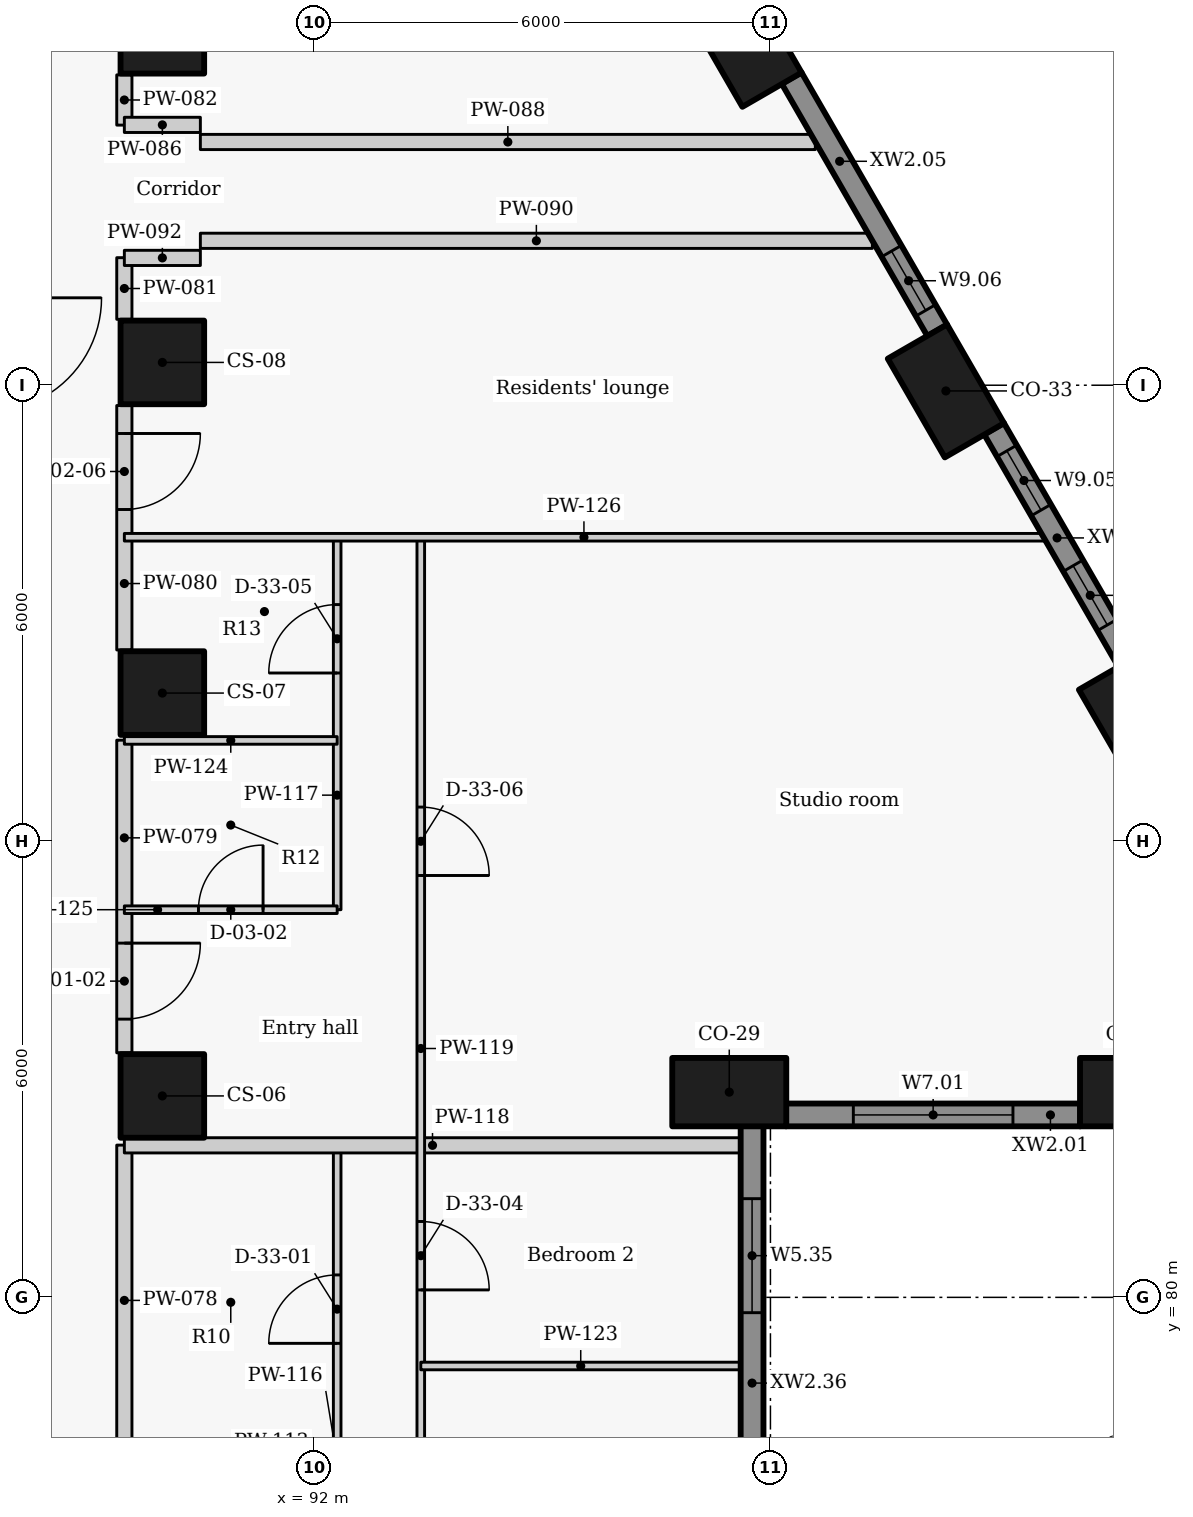
"""IFC4 building model, lengths in metres.
Left out: names, types, materials, properties, quantities, classifications, styles, units other than length and angle.
Written with IfcOpenShell. Run it as: python <this file> out.ifc"""

import sys

from ifc_helpers import new_model, si_unit, direction, frame, frame_2d, origin, origin_2d, place, context, subcontext, project, spatial, rectangle, extrude, element, fill, save


model = new_model("IFC4")
c1 = context("Model", 3, precision=1e-05, world=origin(), true_north=direction((0.0, 1.0)))
c2 = subcontext(c1, "Body", "Model", "MODEL_VIEW")
j1 = project(units=[si_unit("LENGTHUNIT", "METRE"), si_unit("PLANEANGLEUNIT", "RADIAN")], contexts=[c1])
p1 = place(None, origin())
s1 = spatial("IfcSite", under=j1, at=p1, CompositionType="ELEMENT")
p2 = place(p1, origin())
s2 = spatial("IfcBuilding", under=s1, at=p2, CompositionType="ELEMENT")
p3 = place(p2, frame((0.0, 0.0, 41.4)))
s3 = spatial("IfcBuildingStorey", under=s2, at=p3, CompositionType="ELEMENT", Elevation=41.4)
for number, where, z_axis, x_axis in (
    (1, (97.458, 82.7, -0.275), (0.0, 0.0, 1.0), (1.0, 0.0, 0.0)),
    (2, (102.823, 82.7, -0.275), (0.0, 0.0, 1.0), (1.0, 0.0, 0.0)),
    (3, (102.823, 87.57, -0.275), (0.0, 0.0, 1.0), (-0.5, 0.866, 0.0)),
):
    element("IfcColumn", number, at=place(p3, frame(where, z_axis=z_axis, x_axis=x_axis)), inside=s3, PredefinedType="COLUMN", context=c2, shape_type="SweptSolid", body=[
        extrude(rectangle(XDim=1.5, YDim=0.9, at=origin_2d()), origin(), (0.0, 0.0, 1.0), 3.575),
    ])
for number, where, z_axis, x_axis in (
    (4, (100.308, 91.925, 0.0), (0.0, 0.0, 1.0), (-0.5, 0.866, 0.0)),
    (5, (97.646, 96.537, 0.0), (0.0, 0.0, 1.0), (-0.5, 0.866, 0.0)),
):
    element("IfcColumn", number, at=place(p3, frame(where, z_axis=z_axis, x_axis=x_axis)), inside=s3, PredefinedType="COLUMN", context=c2, shape_type="SweptSolid", body=[
        extrude(rectangle(XDim=1.5, YDim=0.9, at=origin_2d()), origin(), (0.0, 0.0, 1.0), 3.3),
    ])
p4 = place(p3, frame((90.0, 82.65, -0.275), z_axis=(0.0, 0.0, 1.0), x_axis=(0.0, 1.0, 0.0)))
e6 = element("IfcColumn", 6, at=p4, inside=s3, PredefinedType="COLUMN", context=c2, shape_type="SweptSolid", body=[
    extrude(rectangle(XDim=1.1, YDim=1.1, at=origin_2d()), origin(), (0.0, 0.0, 1.0), 3.575),
])
for number, where, z_axis, x_axis in (
    (7, (90.0, 87.95, 0.0), (0.0, 0.0, 1.0), (0.0, 1.0, 0.0)),
    (8, (90.0, 92.3, 0.0), (0.0, 0.0, 1.0), (0.0, 1.0, 0.0)),
    (9, (90.0, 96.65, 0.0), (0.0, 0.0, 1.0), (0.0, 1.0, 0.0)),
):
    element("IfcColumn", number, at=place(p3, frame(where, z_axis=z_axis, x_axis=x_axis)), inside=s3, PredefinedType="COLUMN", context=c2, shape_type="SweptSolid", body=[
        extrude(rectangle(XDim=1.1, YDim=1.1, at=origin_2d()), origin(), (0.0, 0.0, 1.0), 3.3),
    ])
p5 = place(p3, frame((98.204, 82.4, 0.0), z_axis=(0.0, 0.0, 1.0), x_axis=(1.0, 0.0, 0.0)))
e10 = element("IfcWall", 10, at=p5, inside=s3, PredefinedType="SOLIDWALL", context=c2, shape_type="SweptSolid", body=[
    extrude(rectangle(XDim=3.873, YDim=0.3, at=frame_2d((1.936, 0.0))), origin(), (0.0, 0.0, 1.0), 2.425),
])
p6 = place(p5, frame((0.886, 0.0, 0.9)))
e11 = element("IfcOpeningElement", 11, at=p6, cuts=e10, PredefinedType="OPENING", context=c2, shape_type="SweptSolid", body=[
    extrude(rectangle(XDim=2.1, YDim=1.1, at=frame_2d((1.05, 0.55))), frame((0.0, 0.16, 0.0), z_axis=(0.0, -1.0, 0.0), x_axis=(1.0, 0.0, 0.0)), (0.0, 0.0, 1.0), 0.32),
])
p7 = place(p3, frame((102.71, 88.366, 0.0), z_axis=(0.0, 0.0, 1.0), x_axis=(-0.499977402622, 0.866038449993, 0.0)))
e12 = element("IfcWall", 12, at=p7, inside=s3, PredefinedType="SOLIDWALL", context=c2, shape_type="SweptSolid", body=[
    extrude(rectangle(XDim=3.537, YDim=0.3, at=frame_2d((1.769, 0.0))), origin(), (0.0, 0.0, 1.0), 2.425),
])
p8 = place(p7, frame((0.555, 0.0, 0.9)))
e13 = element("IfcOpeningElement", 13, at=p8, cuts=e12, PredefinedType="OPENING", context=c2, shape_type="SweptSolid", body=[
    extrude(rectangle(XDim=0.9, YDim=1.1, at=frame_2d((0.45, 0.55))), frame((0.0, 0.16, 0.0), z_axis=(0.0, -1.0, 0.0), x_axis=(1.0, 0.0, 0.0)), (0.0, 0.0, 1.0), 0.32),
])
p9 = place(p7, frame((2.299, 0.0, 0.9)))
e14 = element("IfcOpeningElement", 14, at=p9, cuts=e12, PredefinedType="OPENING", context=c2, shape_type="SweptSolid", body=[
    extrude(rectangle(XDim=0.9, YDim=1.1, at=frame_2d((0.45, 0.55))), frame((0.0, 0.16, 0.0), z_axis=(0.0, -1.0, 0.0), x_axis=(1.0, 0.0, 0.0)), (0.0, 0.0, 1.0), 0.32),
])
p10 = place(p3, frame((100.195, 92.721, 0.0), z_axis=(0.0, 0.0, 1.0), x_axis=(-0.500001735503, 0.866024401789, 0.0)))
e15 = element("IfcWall", 15, at=p10, inside=s3, PredefinedType="SOLIDWALL", context=c2, shape_type="SweptSolid", body=[
    extrude(rectangle(XDim=3.834, YDim=0.3, at=frame_2d((1.917, 0.0))), origin(), (0.0, 0.0, 1.0), 2.425),
])
p11 = place(p10, frame((0.305, 0.0, 0.9)))
e16 = element("IfcOpeningElement", 16, at=p11, cuts=e15, PredefinedType="OPENING", context=c2, shape_type="SweptSolid", body=[
    extrude(rectangle(XDim=0.9, YDim=1.1, at=frame_2d((0.45, 0.55))), frame((0.0, 0.16, 0.0), z_axis=(0.0, -1.0, 0.0), x_axis=(1.0, 0.0, 0.0)), (0.0, 0.0, 1.0), 0.32),
])
p12 = place(p3, frame((97.758, 78.046, 0.0), z_axis=(0.0, 0.0, 1.0), x_axis=(0.0, 1.0, 0.0)))
e17 = element("IfcWall", 17, at=p12, inside=s3, PredefinedType="SOLIDWALL", context=c2, shape_type="SweptSolid", body=[
    extrude(rectangle(XDim=4.208, YDim=0.3, at=frame_2d((2.104, 0.0))), origin(), (0.0, 0.0, 1.0), 2.425),
])
p13 = place(p12, frame((1.752, 0.0, 0.9)))
e18 = element("IfcOpeningElement", 18, at=p13, cuts=e17, PredefinedType="OPENING", context=c2, shape_type="SweptSolid", body=[
    extrude(rectangle(XDim=1.5, YDim=1.1, at=frame_2d((0.75, 0.55))), frame((0.0, 0.16, 0.0), z_axis=(0.0, -1.0, 0.0), x_axis=(1.0, 0.0, 0.0)), (0.0, 0.0, 1.0), 0.32),
])
p14 = place(p3, frame((89.5, 77.917, 0.0), z_axis=(0.0, 0.0, 1.0), x_axis=(0.0, 1.0, 0.0)))
e19 = element("IfcWall", 19, at=p14, inside=s3, PredefinedType="PARTITIONING", context=c2, shape_type="SweptSolid", body=[
    extrude(rectangle(XDim=4.086, YDim=0.2, at=frame_2d((2.043, 0.0))), origin(), (0.0, 0.0, 1.0), 3.025),
])
p15 = place(p3, frame((89.5, 87.33, 0.0), z_axis=(0.0, 0.0, 1.0), x_axis=(0.0, -1.0, 0.0)))
e20 = element("IfcWall", 20, at=p15, inside=s3, PredefinedType="PARTITIONING", context=c2, shape_type="SweptSolid", body=[
    extrude(rectangle(XDim=4.113, YDim=0.2, at=frame_2d((2.057, 0.0))), origin(), (0.0, 0.0, 1.0), 3.025),
])
p16 = place(p15, frame((2.67, 0.0, 0.0)))
e21 = element("IfcOpeningElement", 21, at=p16, cuts=e20, PredefinedType="OPENING", context=c2, shape_type="SweptSolid", body=[
    extrude(rectangle(XDim=1.0, YDim=2.1, at=frame_2d((0.5, 1.05))), frame((0.0, 0.11, 0.0), z_axis=(0.0, -1.0, 0.0), x_axis=(1.0, 0.0, 0.0)), (0.0, 0.0, 1.0), 0.22),
])
p17 = place(p3, frame((89.5, 91.733, 0.0), z_axis=(0.0, 0.0, 1.0), x_axis=(0.0, -1.0, 0.0)))
e22 = element("IfcWall", 22, at=p17, inside=s3, PredefinedType="PARTITIONING", context=c2, shape_type="SweptSolid", body=[
    extrude(rectangle(XDim=3.216, YDim=0.2, at=frame_2d((1.608, 0.0))), origin(), (0.0, 0.0, 1.0), 3.025),
])
p18 = place(p17, frame((0.368, 0.0, 0.0)))
e23 = element("IfcOpeningElement", 23, at=p18, cuts=e22, PredefinedType="OPENING", context=c2, shape_type="SweptSolid", body=[
    extrude(rectangle(XDim=1.0, YDim=2.1, at=frame_2d((0.5, 1.05))), frame((0.0, 0.11, 0.0), z_axis=(0.0, -1.0, 0.0), x_axis=(1.0, 0.0, 0.0)), (0.0, 0.0, 1.0), 0.22),
])
p19 = place(p3, frame((89.5, 92.867, 0.0), z_axis=(0.0, 0.0, 1.0), x_axis=(0.0, 1.0, 0.0)))
e24 = element("IfcWall", 24, at=p19, inside=s3, PredefinedType="PARTITIONING", context=c2, shape_type="SweptSolid", body=[
    extrude(rectangle(XDim=0.811, YDim=0.2, at=frame_2d((0.406, 0.0))), origin(), (0.0, 0.0, 1.0), 3.025),
])
p20 = place(p3, frame((89.5, 95.422, 0.0), z_axis=(0.0, 0.0, 1.0), x_axis=(0.0, 1.0, 0.0)))
e25 = element("IfcWall", 25, at=p20, inside=s3, PredefinedType="PARTITIONING", context=c2, shape_type="SweptSolid", body=[
    extrude(rectangle(XDim=0.661, YDim=0.2, at=frame_2d((0.331, 0.0))), origin(), (0.0, 0.0, 1.0), 3.025),
])
p21 = place(p3, frame((89.5, 95.425, 0.0), z_axis=(0.0, 0.0, 1.0), x_axis=(1.0, 0.0, 0.0)))
e26 = element("IfcWall", 26, at=p21, inside=s3, PredefinedType="PARTITIONING", context=c2, shape_type="SweptSolid", body=[
    extrude(rectangle(XDim=1.0, YDim=0.2, at=frame_2d((0.5, 0.0))), origin(), (0.0, 0.0, 1.0), 2.505),
])
p22 = place(p3, frame((90.5, 95.2, 0.0), z_axis=(0.0, 0.0, 1.0), x_axis=(1.0, 0.0, 0.0)))
e27 = element("IfcWall", 27, at=p22, inside=s3, PredefinedType="PARTITIONING", context=c2, shape_type="SweptSolid", body=[
    extrude(rectangle(XDim=8.091, YDim=0.2, at=frame_2d((4.045, 0.0))), origin(), (0.0, 0.0, 1.0), 2.405),
])
p23 = place(p3, frame((90.5, 93.9, 0.0), z_axis=(0.0, 0.0, 1.0), x_axis=(1.0, 0.0, 0.0)))
e28 = element("IfcWall", 28, at=p23, inside=s3, PredefinedType="PARTITIONING", context=c2, shape_type="SweptSolid", body=[
    extrude(rectangle(XDim=8.841, YDim=0.2, at=frame_2d((4.421, 0.0))), origin(), (0.0, 0.0, 1.0), 2.405),
])
p24 = place(p3, frame((89.5, 93.675, 0.0), z_axis=(0.0, 0.0, 1.0), x_axis=(1.0, 0.0, 0.0)))
e29 = element("IfcWall", 29, at=p24, inside=s3, PredefinedType="PARTITIONING", context=c2, shape_type="SweptSolid", body=[
    extrude(rectangle(XDim=1.0, YDim=0.2, at=frame_2d((0.5, 0.0))), origin(), (0.0, 0.0, 1.0), 2.505),
])
p25 = place(p3, frame((92.3, 74.1, 0.0), z_axis=(0.0, 0.0, 1.0), x_axis=(0.0, 1.0, 0.0)))
e30 = element("IfcWall", 30, at=p25, inside=s3, PredefinedType="PARTITIONING", context=c2, shape_type="SweptSolid", body=[
    extrude(rectangle(XDim=7.9, YDim=0.1, at=frame_2d((3.95, 0.0))), origin(), (0.0, 0.0, 1.0), 3.025),
])
p26 = place(p25, frame((1.37, 0.0, 0.0)))
e31 = element("IfcOpeningElement", 31, at=p26, cuts=e30, PredefinedType="OPENING", context=c2, shape_type="SweptSolid", body=[
    extrude(rectangle(XDim=0.85, YDim=2.1, at=frame_2d((0.425, 1.05))), frame((0.0, 0.06, 0.0), z_axis=(0.0, -1.0, 0.0), x_axis=(1.0, 0.0, 0.0)), (0.0, 0.0, 1.0), 0.12),
])
p27 = place(p25, frame((5.295, 0.0, 0.0)))
e32 = element("IfcOpeningElement", 32, at=p27, cuts=e30, PredefinedType="OPENING", context=c2, shape_type="SweptSolid", body=[
    extrude(rectangle(XDim=0.9, YDim=2.1, at=frame_2d((0.45, 1.05))), frame((0.0, 0.06, 0.0), z_axis=(0.0, -1.0, 0.0), x_axis=(1.0, 0.0, 0.0)), (0.0, 0.0, 1.0), 0.12),
])
p28 = place(p3, frame((92.3, 85.1, 0.0), z_axis=(0.0, 0.0, 1.0), x_axis=(0.0, 1.0, 0.0)))
e33 = element("IfcWall", 33, at=p28, inside=s3, PredefinedType="PARTITIONING", context=c2, shape_type="SweptSolid", body=[
    extrude(rectangle(XDim=4.9, YDim=0.1, at=frame_2d((2.45, 0.0))), origin(), (0.0, 0.0, 1.0), 3.025),
])
p29 = place(p28, frame((3.114, 0.0, 0.0)))
e34 = element("IfcOpeningElement", 34, at=p29, cuts=e33, PredefinedType="OPENING", context=c2, shape_type="SweptSolid", body=[
    extrude(rectangle(XDim=0.9, YDim=2.1, at=frame_2d((0.45, 1.05))), frame((0.0, 0.06, 0.0), z_axis=(0.0, -1.0, 0.0), x_axis=(1.0, 0.0, 0.0)), (0.0, 0.0, 1.0), 0.12),
])
p30 = place(p3, frame((89.5, 82.0, 0.0), z_axis=(0.0, 0.0, 1.0), x_axis=(1.0, 0.0, 0.0)))
e35 = element("IfcWall", 35, at=p30, inside=s3, PredefinedType="PARTITIONING", context=c2, shape_type="SweptSolid", body=[
    extrude(rectangle(XDim=8.108, YDim=0.2, at=frame_2d((4.054, 0.0))), origin(), (0.0, 0.0, 1.0), 2.405),
])
p31 = place(p3, frame((93.4, 90.0, 0.0), z_axis=(0.0, 0.0, 1.0), x_axis=(0.0, -1.0, 0.0)))
e36 = element("IfcWall", 36, at=p31, inside=s3, PredefinedType="PARTITIONING", context=c2, shape_type="SweptSolid", body=[
    extrude(rectangle(XDim=18.0, YDim=0.1, at=frame_2d((9.0, 0.0))), origin(), (0.0, 0.0, 1.0), 3.025),
])
p32 = place(p31, frame((16.098, 0.0, 0.0)))
e37 = element("IfcOpeningElement", 37, at=p32, cuts=e36, PredefinedType="OPENING", context=c2, shape_type="SweptSolid", body=[
    extrude(rectangle(XDim=0.9, YDim=2.1, at=frame_2d((0.45, 1.05))), frame((0.0, 0.06, 0.0), z_axis=(0.0, -1.0, 0.0), x_axis=(1.0, 0.0, 0.0)), (0.0, 0.0, 1.0), 0.12),
])
p33 = place(p31, frame((12.55, 0.0, 0.0)))
e38 = element("IfcOpeningElement", 38, at=p33, cuts=e36, PredefinedType="OPENING", context=c2, shape_type="SweptSolid", body=[
    extrude(rectangle(XDim=0.9, YDim=2.1, at=frame_2d((0.45, 1.05))), frame((0.0, 0.06, 0.0), z_axis=(0.0, -1.0, 0.0), x_axis=(1.0, 0.0, 0.0)), (0.0, 0.0, 1.0), 0.12),
])
p34 = place(p31, frame((9.002, 0.0, 0.0)))
e39 = element("IfcOpeningElement", 39, at=p34, cuts=e36, PredefinedType="OPENING", context=c2, shape_type="SweptSolid", body=[
    extrude(rectangle(XDim=0.9, YDim=2.1, at=frame_2d((0.45, 1.05))), frame((0.0, 0.06, 0.0), z_axis=(0.0, -1.0, 0.0), x_axis=(1.0, 0.0, 0.0)), (0.0, 0.0, 1.0), 0.12),
])
p35 = place(p31, frame((3.55, 0.0, 0.0)))
e40 = element("IfcOpeningElement", 40, at=p35, cuts=e36, PredefinedType="OPENING", context=c2, shape_type="SweptSolid", body=[
    extrude(rectangle(XDim=0.9, YDim=2.1, at=frame_2d((0.45, 1.05))), frame((0.0, 0.06, 0.0), z_axis=(0.0, -1.0, 0.0), x_axis=(1.0, 0.0, 0.0)), (0.0, 0.0, 1.0), 0.12),
])
p36 = place(p3, frame((93.4, 79.097, 0.0), z_axis=(0.0, 0.0, 1.0), x_axis=(1.0, 0.0, 0.0)))
e41 = element("IfcWall", 41, at=p36, inside=s3, PredefinedType="PARTITIONING", context=c2, shape_type="SweptSolid", body=[
    extrude(rectangle(XDim=4.208, YDim=0.1, at=frame_2d((2.104, 0.0))), origin(), (0.0, 0.0, 1.0), 2.405),
])
p37 = place(p3, frame((89.5, 87.327, 0.0), z_axis=(0.0, 0.0, 1.0), x_axis=(1.0, 0.0, 0.0)))
e42 = element("IfcWall", 42, at=p37, inside=s3, PredefinedType="PARTITIONING", context=c2, shape_type="SweptSolid", body=[
    extrude(rectangle(XDim=2.8, YDim=0.1, at=frame_2d((1.4, 0.0))), origin(), (0.0, 0.0, 1.0), 2.505),
])
p38 = place(p3, frame((89.5, 85.1, 0.0), z_axis=(0.0, 0.0, 1.0), x_axis=(1.0, 0.0, 0.0)))
e43 = element("IfcWall", 43, at=p38, inside=s3, PredefinedType="PARTITIONING", context=c2, shape_type="SweptSolid", body=[
    extrude(rectangle(XDim=2.8, YDim=0.1, at=frame_2d((1.4, 0.0))), origin(), (0.0, 0.0, 1.0), 2.505),
])
p39 = place(p38, frame((0.975, 0.0, 0.0)))
e44 = element("IfcOpeningElement", 44, at=p39, cuts=e43, PredefinedType="OPENING", context=c2, shape_type="SweptSolid", body=[
    extrude(rectangle(XDim=0.85, YDim=2.1, at=frame_2d((0.425, 1.05))), frame((0.0, 0.06, 0.0), z_axis=(0.0, -1.0, 0.0), x_axis=(1.0, 0.0, 0.0)), (0.0, 0.0, 1.0), 0.12),
])
p40 = place(p3, frame((89.5, 90.0, 0.0), z_axis=(0.0, 0.0, 1.0), x_axis=(1.0, 0.0, 0.0)))
e45 = element("IfcWall", 45, at=p40, inside=s3, PredefinedType="PARTITIONING", context=c2, shape_type="SweptSolid", body=[
    extrude(rectangle(XDim=12.093, YDim=0.1, at=frame_2d((6.046, 0.0))), origin(), (0.0, 0.0, 1.0), 2.405),
])
p41 = place(p6, origin())
e46 = element("IfcWindow", 46, at=p41, inside=s3, PartitioningType="SINGLE_PANEL", PredefinedType="WINDOW", context=c2, shape_type="SweptSolid", body=[
    extrude(rectangle(XDim=2.1, YDim=1.1, at=frame_2d((1.05, 0.55))), frame((0.0, 0.03, 0.0), z_axis=(0.0, -1.0, 0.0), x_axis=(1.0, 0.0, 0.0)), (0.0, 0.0, 1.0), 0.06),
])
fill(e11, e46)
p42 = place(p8, origin())
e47 = element("IfcWindow", 47, at=p42, inside=s3, PartitioningType="SINGLE_PANEL", PredefinedType="WINDOW", context=c2, shape_type="SweptSolid", body=[
    extrude(rectangle(XDim=0.9, YDim=1.1, at=frame_2d((0.45, 0.55))), frame((0.0, 0.03, 0.0), z_axis=(0.0, -1.0, 0.0), x_axis=(1.0, 0.0, 0.0)), (0.0, 0.0, 1.0), 0.06),
])
fill(e13, e47)
p43 = place(p9, origin())
e48 = element("IfcWindow", 48, at=p43, inside=s3, PartitioningType="SINGLE_PANEL", PredefinedType="WINDOW", context=c2, shape_type="SweptSolid", body=[
    extrude(rectangle(XDim=0.9, YDim=1.1, at=frame_2d((0.45, 0.55))), frame((0.0, 0.03, 0.0), z_axis=(0.0, -1.0, 0.0), x_axis=(1.0, 0.0, 0.0)), (0.0, 0.0, 1.0), 0.06),
])
fill(e14, e48)
p44 = place(p11, origin())
e49 = element("IfcWindow", 49, at=p44, inside=s3, PartitioningType="SINGLE_PANEL", PredefinedType="WINDOW", context=c2, shape_type="SweptSolid", body=[
    extrude(rectangle(XDim=0.9, YDim=1.1, at=frame_2d((0.45, 0.55))), frame((0.0, 0.03, 0.0), z_axis=(0.0, -1.0, 0.0), x_axis=(1.0, 0.0, 0.0)), (0.0, 0.0, 1.0), 0.06),
])
fill(e16, e49)
p45 = place(p13, origin())
e50 = element("IfcWindow", 50, at=p45, inside=s3, PartitioningType="SINGLE_PANEL", PredefinedType="WINDOW", context=c2, shape_type="SweptSolid", body=[
    extrude(rectangle(XDim=1.5, YDim=1.1, at=frame_2d((0.75, 0.55))), frame((0.0, 0.03, 0.0), z_axis=(0.0, -1.0, 0.0), x_axis=(1.0, 0.0, 0.0)), (0.0, 0.0, 1.0), 0.06),
])
fill(e18, e50)
p46 = place(p27, origin())
e51 = element("IfcDoor", 51, at=p46, inside=s3, OperationType="SINGLE_SWING_LEFT", PredefinedType="DOOR", context=c2, shape_type="SweptSolid", body=[
    extrude(rectangle(XDim=0.9, YDim=2.1, at=frame_2d((0.45, 1.05))), frame((0.0, 0.025, 0.0), z_axis=(0.0, -1.0, 0.0), x_axis=(1.0, 0.0, 0.0)), (0.0, 0.0, 1.0), 0.05),
])
fill(e32, e51)
p47 = place(p34, origin())
e52 = element("IfcDoor", 52, at=p47, inside=s3, OperationType="SINGLE_SWING_RIGHT", PredefinedType="DOOR", context=c2, shape_type="SweptSolid", body=[
    extrude(rectangle(XDim=0.9, YDim=2.1, at=frame_2d((0.45, 1.05))), frame((0.0, 0.025, 0.0), z_axis=(0.0, -1.0, 0.0), x_axis=(1.0, 0.0, 0.0)), (0.0, 0.0, 1.0), 0.05),
])
fill(e39, e52)
p48 = place(p16, origin())
e53 = element("IfcDoor", 53, at=p48, inside=s3, OperationType="SINGLE_SWING_LEFT", PredefinedType="DOOR", context=c2, shape_type="SweptSolid", body=[
    extrude(rectangle(XDim=1.0, YDim=2.1, at=frame_2d((0.5, 1.05))), frame((0.0, 0.025, 0.0), z_axis=(0.0, -1.0, 0.0), x_axis=(1.0, 0.0, 0.0)), (0.0, 0.0, 1.0), 0.05),
])
fill(e21, e53)
p49 = place(p39, origin())
e54 = element("IfcDoor", 54, at=p49, inside=s3, OperationType="SINGLE_SWING_RIGHT", PredefinedType="DOOR", context=c2, shape_type="SweptSolid", body=[
    extrude(rectangle(XDim=0.85, YDim=2.1, at=frame_2d((0.425, 1.05))), frame((0.0, 0.025, 0.0), z_axis=(0.0, -1.0, 0.0), x_axis=(1.0, 0.0, 0.0)), (0.0, 0.0, 1.0), 0.05),
])
fill(e44, e54)
p50 = place(p29, origin())
e55 = element("IfcDoor", 55, at=p50, inside=s3, OperationType="SINGLE_SWING_LEFT", PredefinedType="DOOR", context=c2, shape_type="SweptSolid", body=[
    extrude(rectangle(XDim=0.9, YDim=2.1, at=frame_2d((0.45, 1.05))), frame((0.0, 0.025, 0.0), z_axis=(0.0, -1.0, 0.0), x_axis=(1.0, 0.0, 0.0)), (0.0, 0.0, 1.0), 0.05),
])
fill(e34, e55)
p51 = place(p35, origin())
e56 = element("IfcDoor", 56, at=p51, inside=s3, OperationType="SINGLE_SWING_RIGHT", PredefinedType="DOOR", context=c2, shape_type="SweptSolid", body=[
    extrude(rectangle(XDim=0.9, YDim=2.1, at=frame_2d((0.45, 1.05))), frame((0.0, 0.025, 0.0), z_axis=(0.0, -1.0, 0.0), x_axis=(1.0, 0.0, 0.0)), (0.0, 0.0, 1.0), 0.05),
])
fill(e40, e56)
p52 = place(p18, origin())
e57 = element("IfcDoor", 57, at=p52, inside=s3, OperationType="SINGLE_SWING_LEFT", PredefinedType="DOOR", context=c2, shape_type="SweptSolid", body=[
    extrude(rectangle(XDim=1.0, YDim=2.1, at=frame_2d((0.5, 1.05))), frame((0.0, 0.025, 0.0), z_axis=(0.0, -1.0, 0.0), x_axis=(1.0, 0.0, 0.0)), (0.0, 0.0, 1.0), 0.05),
])
fill(e23, e57)
save(model, sys.argv[1])
